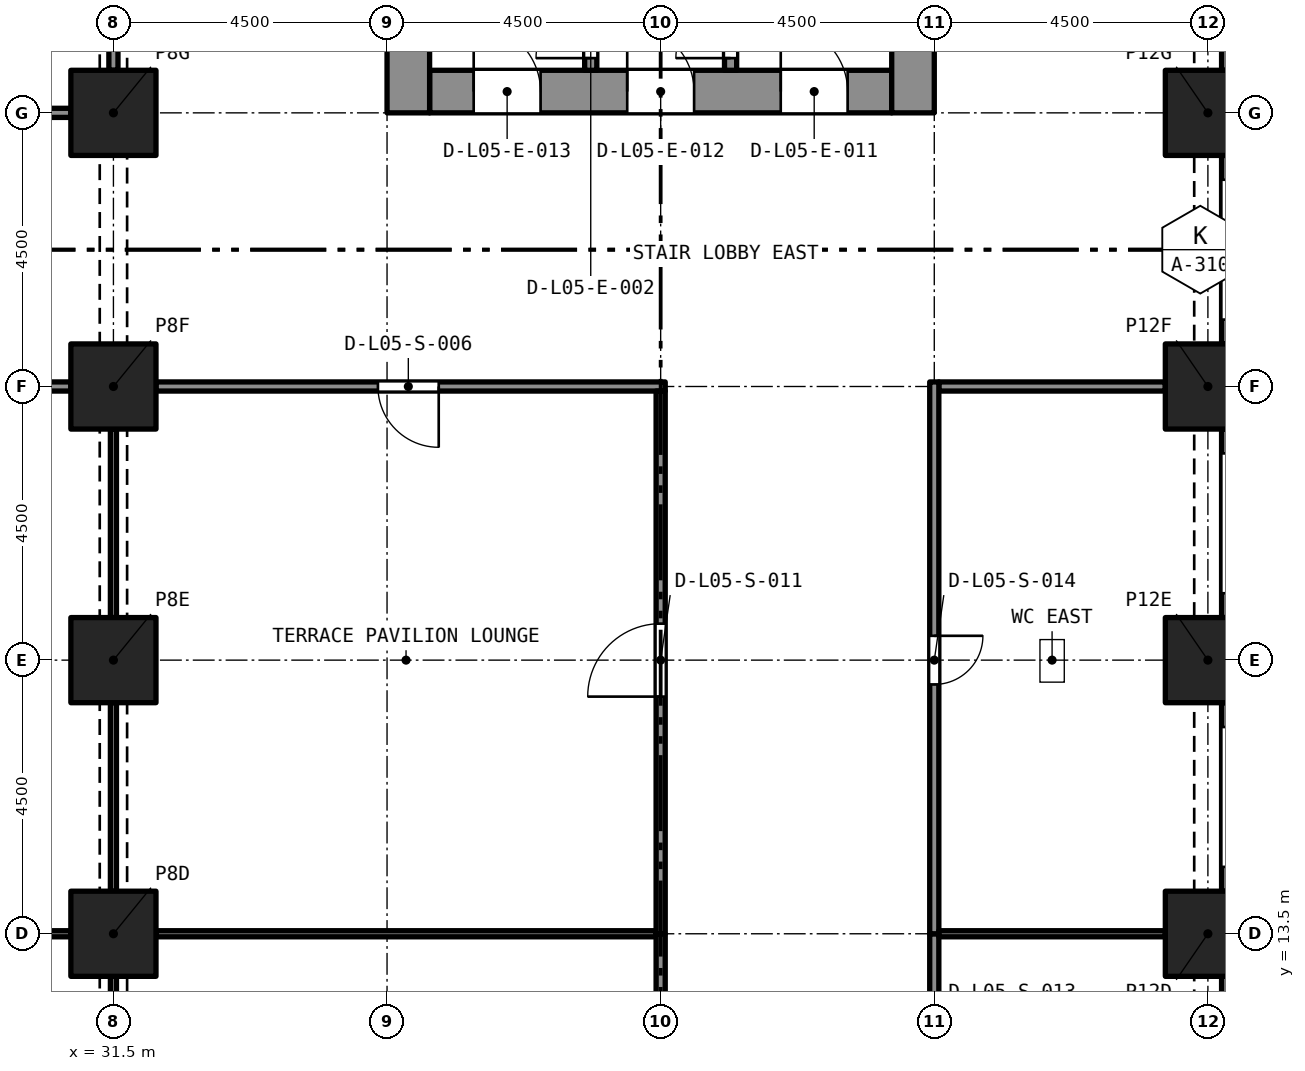
"""IFC4 building model, lengths in metres.
Left out: names, types, materials, properties, quantities, classifications, styles, units other than length and angle.
Written with IfcOpenShell. Run it as: python <this file> out.ifc"""

import sys

from ifc_helpers import new_model, si_unit, direction, frame, frame_2d, origin, origin_2d, place, context, subcontext, project, spatial, rectangle, extrude, element, fill, save


model = new_model("IFC4")
c1 = context("Model", 3, precision=1e-05, world=origin(), true_north=direction((0.0, 1.0)))
c2 = subcontext(c1, "Body", "Model", "MODEL_VIEW")
j1 = project(units=[si_unit("LENGTHUNIT", "METRE"), si_unit("PLANEANGLEUNIT", "RADIAN")], contexts=[c1])
p1 = place(None, origin())
s1 = spatial("IfcSite", under=j1, at=p1, CompositionType="ELEMENT")
p2 = place(p1, origin())
s2 = spatial("IfcBuilding", under=s1, at=p2, CompositionType="ELEMENT")
p3 = place(p2, frame((0.0, 0.0, 26.0)))
s3 = spatial("IfcBuildingStorey", under=s2, at=p3, CompositionType="ELEMENT", Elevation=26.0)
for number, where, z_axis, x_axis in (
    (1, (31.5, 13.5, 0.0), (0.0, 0.0, 1.0), (1.0, 0.0, 0.0)),
    (2, (49.5, 13.5, 0.0), (0.0, 0.0, 1.0), (1.0, 0.0, 0.0)),
    (3, (31.5, 18.0, 0.0), (0.0, 0.0, 1.0), (1.0, 0.0, 0.0)),
    (4, (49.5, 18.0, 0.0), (0.0, 0.0, 1.0), (1.0, 0.0, 0.0)),
    (5, (31.5, 22.5, 0.0), (0.0, 0.0, 1.0), (1.0, 0.0, 0.0)),
    (6, (49.5, 22.5, 0.0), (0.0, 0.0, 1.0), (1.0, 0.0, 0.0)),
    (7, (31.5, 27.0, 0.0), (0.0, 0.0, 1.0), (1.0, 0.0, 0.0)),
    (8, (49.5, 27.0, 0.0), (0.0, 0.0, 1.0), (1.0, 0.0, 0.0)),
):
    element("IfcColumn", number, at=place(p3, frame(where, z_axis=z_axis, x_axis=x_axis)), inside=s3, PredefinedType="COLUMN", context=c2, shape_type="SweptSolid", body=[
        extrude(rectangle(XDim=1.4, YDim=1.4, at=origin_2d()), origin(), (0.0, 0.0, 1.0), 4.4),
    ])
p4 = place(p3, frame((36.7, 27.35, 0.0), z_axis=(0.0, 0.0, 1.0), x_axis=(1.0, 0.0, 0.0)))
e9 = element("IfcWall", 9, at=p4, inside=s3, PredefinedType="SOLIDWALL", context=c2, shape_type="SweptSolid", body=[
    extrude(rectangle(XDim=7.6, YDim=0.7, at=frame_2d((3.8, 0.0))), origin(), (0.0, 0.0, 1.0), 4.4),
])
p5 = place(p4, frame((5.775, 0.0, 0.0)))
e10 = element("IfcOpeningElement", 10, at=p5, cuts=e9, PredefinedType="OPENING", context=c2, shape_type="SweptSolid", body=[
    extrude(rectangle(XDim=1.1, YDim=2.1, at=frame_2d((0.55, 1.05))), frame((0.0, 0.36, 0.0), z_axis=(0.0, -1.0, 0.0), x_axis=(1.0, 0.0, 0.0)), (0.0, 0.0, 1.0), 0.72),
])
p6 = place(p4, frame((3.25, 0.0, 0.0)))
e11 = element("IfcOpeningElement", 11, at=p6, cuts=e9, PredefinedType="OPENING", context=c2, shape_type="SweptSolid", body=[
    extrude(rectangle(XDim=1.1, YDim=2.1, at=frame_2d((0.55, 1.05))), frame((0.0, 0.36, 0.0), z_axis=(0.0, -1.0, 0.0), x_axis=(1.0, 0.0, 0.0)), (0.0, 0.0, 1.0), 0.72),
])
p7 = place(p4, frame((0.725, 0.0, 0.0)))
e12 = element("IfcOpeningElement", 12, at=p7, cuts=e9, PredefinedType="OPENING", context=c2, shape_type="SweptSolid", body=[
    extrude(rectangle(XDim=1.1, YDim=2.1, at=frame_2d((0.55, 1.05))), frame((0.0, 0.36, 0.0), z_axis=(0.0, -1.0, 0.0), x_axis=(1.0, 0.0, 0.0)), (0.0, 0.0, 1.0), 0.72),
])
p8 = place(p3, frame((36.35, 27.0, 0.0), z_axis=(0.0, 0.0, 1.0), x_axis=(0.0, 1.0, 0.0)))
e13 = element("IfcWall", 13, at=p8, inside=s3, PredefinedType="SOLIDWALL", context=c2, shape_type="SweptSolid", body=[
    extrude(rectangle(XDim=13.5, YDim=0.7, at=frame_2d((6.75, 0.0))), origin(), (0.0, 0.0, 1.0), 4.4),
])
p9 = place(p8, frame((8.95, 0.0, 0.0)))
e14 = element("IfcOpeningElement", 14, at=p9, cuts=e13, PredefinedType="OPENING", context=c2, shape_type="SweptSolid", body=[
    extrude(rectangle(XDim=1.2, YDim=2.1, at=frame_2d((0.6, 1.05))), frame((0.0, 0.36, 0.0), z_axis=(0.0, -1.0, 0.0), x_axis=(1.0, 0.0, 0.0)), (0.0, 0.0, 1.0), 0.72),
])
p10 = place(p3, frame((44.65, 27.0, 0.0), z_axis=(0.0, 0.0, 1.0), x_axis=(0.0, 1.0, 0.0)))
e15 = element("IfcWall", 15, at=p10, inside=s3, PredefinedType="SOLIDWALL", context=c2, shape_type="SweptSolid", body=[
    extrude(rectangle(XDim=13.5, YDim=0.7, at=frame_2d((6.75, 0.0))), origin(), (0.0, 0.0, 1.0), 4.4),
])
p11 = place(p10, frame((8.95, 0.0, 0.0)))
e16 = element("IfcOpeningElement", 16, at=p11, cuts=e15, PredefinedType="OPENING", context=c2, shape_type="SweptSolid", body=[
    extrude(rectangle(XDim=1.2, YDim=2.1, at=frame_2d((0.6, 1.05))), frame((0.0, 0.36, 0.0), z_axis=(0.0, -1.0, 0.0), x_axis=(1.0, 0.0, 0.0)), (0.0, 0.0, 1.0), 0.72),
])
p12 = place(p3, frame((49.875, 12.8, 0.0), z_axis=(0.0, 0.0, 1.0), x_axis=(0.0, -1.0, 0.0)))
e17 = element("IfcWall", 17, at=p12, inside=s3, PredefinedType="SOLIDWALL", context=c2, shape_type="SweptSolid", body=[
    extrude(rectangle(XDim=3.1, YDim=0.3, at=frame_2d((1.55, 0.0))), origin(), (0.0, 0.0, 1.0), 4.4),
])
p13 = place(p12, frame((0.4, 0.0, 0.45)))
e18 = element("IfcOpeningElement", 18, at=p13, cuts=e17, PredefinedType="OPENING", context=c2, shape_type="SweptSolid", body=[
    extrude(rectangle(XDim=2.3, YDim=2.55, at=frame_2d((1.15, 1.275))), frame((0.0, 0.16, 0.0), z_axis=(0.0, -1.0, 0.0), x_axis=(1.0, 0.0, 0.0)), (0.0, 0.0, 1.0), 0.32),
])
p14 = place(p3, frame((49.875, 17.3, 0.0), z_axis=(0.0, 0.0, 1.0), x_axis=(0.0, -1.0, 0.0)))
e19 = element("IfcWall", 19, at=p14, inside=s3, PredefinedType="SOLIDWALL", context=c2, shape_type="SweptSolid", body=[
    extrude(rectangle(XDim=3.1, YDim=0.3, at=frame_2d((1.55, 0.0))), origin(), (0.0, 0.0, 1.0), 4.4),
])
p15 = place(p14, frame((0.4, 0.0, 0.45)))
e20 = element("IfcOpeningElement", 20, at=p15, cuts=e19, PredefinedType="OPENING", context=c2, shape_type="SweptSolid", body=[
    extrude(rectangle(XDim=2.3, YDim=2.55, at=frame_2d((1.15, 1.275))), frame((0.0, 0.16, 0.0), z_axis=(0.0, -1.0, 0.0), x_axis=(1.0, 0.0, 0.0)), (0.0, 0.0, 1.0), 0.32),
])
p16 = place(p3, frame((49.875, 21.8, 0.0), z_axis=(0.0, 0.0, 1.0), x_axis=(0.0, -1.0, 0.0)))
e21 = element("IfcWall", 21, at=p16, inside=s3, PredefinedType="SOLIDWALL", context=c2, shape_type="SweptSolid", body=[
    extrude(rectangle(XDim=3.1, YDim=0.3, at=frame_2d((1.55, 0.0))), origin(), (0.0, 0.0, 1.0), 4.4),
])
p17 = place(p16, frame((0.4, 0.0, 0.45)))
e22 = element("IfcOpeningElement", 22, at=p17, cuts=e21, PredefinedType="OPENING", context=c2, shape_type="SweptSolid", body=[
    extrude(rectangle(XDim=2.3, YDim=2.55, at=frame_2d((1.15, 1.275))), frame((0.0, 0.16, 0.0), z_axis=(0.0, -1.0, 0.0), x_axis=(1.0, 0.0, 0.0)), (0.0, 0.0, 1.0), 0.32),
])
p18 = place(p3, frame((49.875, 26.3, 0.0), z_axis=(0.0, 0.0, 1.0), x_axis=(0.0, -1.0, 0.0)))
e23 = element("IfcWall", 23, at=p18, inside=s3, PredefinedType="SOLIDWALL", context=c2, shape_type="SweptSolid", body=[
    extrude(rectangle(XDim=3.1, YDim=0.3, at=frame_2d((1.55, 0.0))), origin(), (0.0, 0.0, 1.0), 4.4),
])
p19 = place(p18, frame((0.4, 0.0, 0.45)))
e24 = element("IfcOpeningElement", 24, at=p19, cuts=e23, PredefinedType="OPENING", context=c2, shape_type="SweptSolid", body=[
    extrude(rectangle(XDim=2.3, YDim=2.55, at=frame_2d((1.15, 1.275))), frame((0.0, 0.16, 0.0), z_axis=(0.0, -1.0, 0.0), x_axis=(1.0, 0.0, 0.0)), (0.0, 0.0, 1.0), 0.32),
])
p20 = place(p3, frame((49.875, 30.8, 0.0), z_axis=(0.0, 0.0, 1.0), x_axis=(0.0, -1.0, 0.0)))
e25 = element("IfcWall", 25, at=p20, inside=s3, PredefinedType="SOLIDWALL", context=c2, shape_type="SweptSolid", body=[
    extrude(rectangle(XDim=3.1, YDim=0.3, at=frame_2d((1.55, 0.0))), origin(), (0.0, 0.0, 1.0), 4.4),
])
p21 = place(p20, frame((0.4, 0.0, 0.45)))
e26 = element("IfcOpeningElement", 26, at=p21, cuts=e25, PredefinedType="OPENING", context=c2, shape_type="SweptSolid", body=[
    extrude(rectangle(XDim=2.3, YDim=2.55, at=frame_2d((1.15, 1.275))), frame((0.0, 0.16, 0.0), z_axis=(0.0, -1.0, 0.0), x_axis=(1.0, 0.0, 0.0)), (0.0, 0.0, 1.0), 0.32),
])
p22 = place(p3, frame((41.65, 27.7, 0.0), z_axis=(0.0, 0.0, 1.0), x_axis=(0.0, 1.0, 0.0)))
e27 = element("IfcWall", 27, at=p22, inside=s3, PredefinedType="SOLIDWALL", context=c2, shape_type="SweptSolid", body=[
    extrude(rectangle(XDim=5.4, YDim=0.2, at=frame_2d((2.7, 0.0))), origin(), (0.0, 0.0, 1.0), 4.1),
])
p23 = place(p22, frame((0.2, 0.0, 0.0)))
e28 = element("IfcOpeningElement", 28, at=p23, cuts=e27, PredefinedType="OPENING", context=c2, shape_type="SweptSolid", body=[
    extrude(rectangle(XDim=0.9, YDim=2.1, at=frame_2d((0.45, 1.05))), frame((0.0, 0.11, 0.0), z_axis=(0.0, -1.0, 0.0), x_axis=(1.0, 0.0, 0.0)), (0.0, 0.0, 1.0), 0.22),
])
p24 = place(p3, frame((39.35, 27.7, 0.0), z_axis=(0.0, 0.0, 1.0), x_axis=(0.0, 1.0, 0.0)))
e29 = element("IfcWall", 29, at=p24, inside=s3, PredefinedType="SOLIDWALL", context=c2, shape_type="SweptSolid", body=[
    extrude(rectangle(XDim=5.4, YDim=0.2, at=frame_2d((2.7, 0.0))), origin(), (0.0, 0.0, 1.0), 4.1),
])
p25 = place(p24, frame((0.2, 0.0, 0.0)))
e30 = element("IfcOpeningElement", 30, at=p25, cuts=e29, PredefinedType="OPENING", context=c2, shape_type="SweptSolid", body=[
    extrude(rectangle(XDim=0.9, YDim=2.1, at=frame_2d((0.45, 1.05))), frame((0.0, 0.11, 0.0), z_axis=(0.0, -1.0, 0.0), x_axis=(1.0, 0.0, 0.0)), (0.0, 0.0, 1.0), 0.22),
])
p26 = place(p3, frame((18.7, 27.0, 0.0), z_axis=(0.0, 0.0, 1.0), x_axis=(1.0, 0.0, 0.0)))
e31 = element("IfcWall", 31, at=p26, inside=s3, PredefinedType="PARTITIONING", context=c2, shape_type="SweptSolid", body=[
    extrude(rectangle(XDim=12.1, YDim=0.15, at=frame_2d((6.05, 0.0))), origin(), (0.0, 0.0, 1.0), 3.95),
])
p27 = place(p26, frame((5.45, 0.0, 0.0)))
e32 = element("IfcOpeningElement", 32, at=p27, cuts=e31, PredefinedType="OPENING", context=c2, shape_type="SweptSolid", body=[
    extrude(rectangle(XDim=1.2, YDim=2.1, at=frame_2d((0.6, 1.05))), frame((0.0, 0.085, 0.0), z_axis=(0.0, -1.0, 0.0), x_axis=(1.0, 0.0, 0.0)), (0.0, 0.0, 1.0), 0.17),
])
p28 = place(p3, frame((30.8, 22.5, 0.0), z_axis=(0.0, 0.0, 1.0), x_axis=(-1.0, 0.0, 0.0)))
e33 = element("IfcWall", 33, at=p28, inside=s3, PredefinedType="PARTITIONING", context=c2, shape_type="SweptSolid", body=[
    extrude(rectangle(XDim=12.1, YDim=0.15, at=frame_2d((6.05, 0.0))), origin(), (0.0, 0.0, 1.0), 3.95),
])
p29 = place(p28, frame((5.55, 0.0, 0.0)))
e34 = element("IfcOpeningElement", 34, at=p29, cuts=e33, PredefinedType="OPENING", context=c2, shape_type="SweptSolid", body=[
    extrude(rectangle(XDim=1.0, YDim=2.1, at=frame_2d((0.5, 1.05))), frame((0.0, 0.085, 0.0), z_axis=(0.0, -1.0, 0.0), x_axis=(1.0, 0.0, 0.0)), (0.0, 0.0, 1.0), 0.17),
])
p30 = place(p3, frame((31.5, 27.7, 0.0), z_axis=(0.0, 0.0, 1.0), x_axis=(0.0, 1.0, 0.0)))
e35 = element("IfcWall", 35, at=p30, inside=s3, PredefinedType="PARTITIONING", context=c2, shape_type="SweptSolid", body=[
    extrude(rectangle(XDim=3.1, YDim=0.15, at=frame_2d((1.55, 0.0))), origin(), (0.0, 0.0, 1.0), 3.58),
])
p31 = place(p3, frame((30.8, 13.5, 0.0), z_axis=(0.0, 0.0, 1.0), x_axis=(-1.0, 0.0, 0.0)))
e36 = element("IfcWall", 36, at=p31, inside=s3, PredefinedType="PARTITIONING", context=c2, shape_type="SweptSolid", body=[
    extrude(rectangle(XDim=12.1, YDim=0.1, at=frame_2d((6.05, 0.0))), origin(), (0.0, 0.0, 1.0), 3.95),
])
p32 = place(p31, frame((5.55, 0.0, 0.0)))
e37 = element("IfcOpeningElement", 37, at=p32, cuts=e36, PredefinedType="OPENING", context=c2, shape_type="SweptSolid", body=[
    extrude(rectangle(XDim=1.0, YDim=2.1, at=frame_2d((0.5, 1.05))), frame((0.0, 0.06, 0.0), z_axis=(0.0, -1.0, 0.0), x_axis=(1.0, 0.0, 0.0)), (0.0, 0.0, 1.0), 0.12),
])
for number, where, z_axis, x_axis in (
    (38, (31.5, 9.7, 0.0), (0.0, 0.0, 1.0), (0.0, 1.0, 0.0)),
    (39, (31.5, 18.7, 0.0), (0.0, 0.0, 1.0), (0.0, 1.0, 0.0)),
    (40, (31.5, 14.2, 0.0), (0.0, 0.0, 1.0), (0.0, 1.0, 0.0)),
):
    element("IfcWall", number, at=place(p3, frame(where, z_axis=z_axis, x_axis=x_axis)), inside=s3, PredefinedType="PARTITIONING", context=c2, shape_type="SweptSolid", body=[
        extrude(rectangle(XDim=3.1, YDim=0.1, at=frame_2d((1.55, 0.0))), origin(), (0.0, 0.0, 1.0), 3.58),
    ])
p33 = place(p3, frame((40.575, 22.5, 0.0), z_axis=(0.0, 0.0, 1.0), x_axis=(-1.0, 0.0, 0.0)))
e41 = element("IfcWall", 41, at=p33, inside=s3, PredefinedType="PARTITIONING", context=c2, shape_type="SweptSolid", body=[
    extrude(rectangle(XDim=8.375, YDim=0.15, at=frame_2d((4.188, 0.0))), origin(), (0.0, 0.0, 1.0), 4.1),
])
p34 = place(p33, frame((3.725, 0.0, 0.0)))
e42 = element("IfcOpeningElement", 42, at=p34, cuts=e41, PredefinedType="OPENING", context=c2, shape_type="SweptSolid", body=[
    extrude(rectangle(XDim=1.0, YDim=2.1, at=frame_2d((0.5, 1.05))), frame((0.0, 0.085, 0.0), z_axis=(0.0, -1.0, 0.0), x_axis=(1.0, 0.0, 0.0)), (0.0, 0.0, 1.0), 0.17),
])
p35 = place(p3, frame((45.075, 22.5, 0.0), z_axis=(0.0, 0.0, 1.0), x_axis=(1.0, 0.0, 0.0)))
e43 = element("IfcWall", 43, at=p35, inside=s3, PredefinedType="PARTITIONING", context=c2, shape_type="SweptSolid", body=[
    extrude(rectangle(XDim=3.725, YDim=0.15, at=frame_2d((1.863, 0.0))), origin(), (0.0, 0.0, 1.0), 4.1),
])
p36 = place(p3, frame((32.2, 13.5, 0.0), z_axis=(0.0, 0.0, 1.0), x_axis=(1.0, 0.0, 0.0)))
e44 = element("IfcWall", 44, at=p36, inside=s3, PredefinedType="PARTITIONING", context=c2, shape_type="SweptSolid", body=[
    extrude(rectangle(XDim=8.225, YDim=0.1, at=frame_2d((4.113, 0.0))), origin(), (0.0, 0.0, 1.0), 4.1),
])
p37 = place(p3, frame((40.5, 0.7, 0.0), z_axis=(0.0, 0.0, 1.0), x_axis=(0.0, 1.0, 0.0)))
e45 = element("IfcWall", 45, at=p37, inside=s3, PredefinedType="PARTITIONING", context=c2, shape_type="SweptSolid", body=[
    extrude(rectangle(XDim=12.8, YDim=0.15, at=frame_2d((6.4, 0.0))), origin(), (0.0, 0.0, 1.0), 4.1),
])
p38 = place(p37, frame((5.8, 0.0, 0.0)))
e46 = element("IfcOpeningElement", 46, at=p38, cuts=e45, PredefinedType="OPENING", context=c2, shape_type="SweptSolid", body=[
    extrude(rectangle(XDim=1.2, YDim=2.1, at=frame_2d((0.6, 1.05))), frame((0.0, 0.085, 0.0), z_axis=(0.0, -1.0, 0.0), x_axis=(1.0, 0.0, 0.0)), (0.0, 0.0, 1.0), 0.17),
])
p39 = place(p3, frame((40.5, 13.5, 0.0), z_axis=(0.0, 0.0, 1.0), x_axis=(0.0, 1.0, 0.0)))
e47 = element("IfcWall", 47, at=p39, inside=s3, PredefinedType="PARTITIONING", context=c2, shape_type="SweptSolid", body=[
    extrude(rectangle(XDim=8.925, YDim=0.15, at=frame_2d((4.462, 0.0))), origin(), (0.0, 0.0, 1.0), 4.1),
])
p40 = place(p39, frame((3.9, 0.0, 0.0)))
e48 = element("IfcOpeningElement", 48, at=p40, cuts=e47, PredefinedType="OPENING", context=c2, shape_type="SweptSolid", body=[
    extrude(rectangle(XDim=1.2, YDim=2.1, at=frame_2d((0.6, 1.05))), frame((0.0, 0.085, 0.0), z_axis=(0.0, -1.0, 0.0), x_axis=(1.0, 0.0, 0.0)), (0.0, 0.0, 1.0), 0.17),
])
p41 = place(p3, frame((45.0, 13.5, 0.0), z_axis=(0.0, 0.0, 1.0), x_axis=(0.0, -1.0, 0.0)))
e49 = element("IfcWall", 49, at=p41, inside=s3, PredefinedType="PARTITIONING", context=c2, shape_type="SweptSolid", body=[
    extrude(rectangle(XDim=4.5, YDim=0.15, at=frame_2d((2.25, 0.0))), origin(), (0.0, 0.0, 1.0), 4.1),
])
p42 = place(p41, frame((1.85, 0.0, 0.0)))
e50 = element("IfcOpeningElement", 50, at=p42, cuts=e49, PredefinedType="OPENING", context=c2, shape_type="SweptSolid", body=[
    extrude(rectangle(XDim=0.8, YDim=2.1, at=frame_2d((0.4, 1.05))), frame((0.0, 0.085, 0.0), z_axis=(0.0, -1.0, 0.0), x_axis=(1.0, 0.0, 0.0)), (0.0, 0.0, 1.0), 0.17),
])
p43 = place(p3, frame((45.0, 22.575, 0.0), z_axis=(0.0, 0.0, 1.0), x_axis=(0.0, -1.0, 0.0)))
e51 = element("IfcWall", 51, at=p43, inside=s3, PredefinedType="PARTITIONING", context=c2, shape_type="SweptSolid", body=[
    extrude(rectangle(XDim=9.075, YDim=0.15, at=frame_2d((4.538, 0.0))), origin(), (0.0, 0.0, 1.0), 4.1),
])
p44 = place(p43, frame((4.175, 0.0, 0.0)))
e52 = element("IfcOpeningElement", 52, at=p44, cuts=e51, PredefinedType="OPENING", context=c2, shape_type="SweptSolid", body=[
    extrude(rectangle(XDim=0.8, YDim=2.1, at=frame_2d((0.4, 1.05))), frame((0.0, 0.085, 0.0), z_axis=(0.0, -1.0, 0.0), x_axis=(1.0, 0.0, 0.0)), (0.0, 0.0, 1.0), 0.17),
])
p45 = place(p3, frame((45.075, 13.5, 0.0), z_axis=(0.0, 0.0, 1.0), x_axis=(1.0, 0.0, 0.0)))
e53 = element("IfcWall", 53, at=p45, inside=s3, PredefinedType="PARTITIONING", context=c2, shape_type="SweptSolid", body=[
    extrude(rectangle(XDim=3.725, YDim=0.1, at=frame_2d((1.863, 0.0))), origin(), (0.0, 0.0, 1.0), 4.1),
])
p46 = place(p23, origin())
e54 = element("IfcDoor", 54, at=p46, inside=s3, OperationType="SINGLE_SWING_LEFT", PredefinedType="DOOR", context=c2, shape_type="SweptSolid", body=[
    extrude(rectangle(XDim=0.9, YDim=2.1, at=frame_2d((0.45, 1.05))), frame((0.0, 0.025, 0.0), z_axis=(0.0, -1.0, 0.0), x_axis=(1.0, 0.0, 0.0)), (0.0, 0.0, 1.0), 0.05),
])
fill(e28, e54)
p47 = place(p25, origin())
e55 = element("IfcDoor", 55, at=p47, inside=s3, OperationType="SINGLE_SWING_LEFT", PredefinedType="DOOR", context=c2, shape_type="SweptSolid", body=[
    extrude(rectangle(XDim=0.9, YDim=2.1, at=frame_2d((0.45, 1.05))), frame((0.0, 0.025, 0.0), z_axis=(0.0, -1.0, 0.0), x_axis=(1.0, 0.0, 0.0)), (0.0, 0.0, 1.0), 0.05),
])
fill(e30, e55)
p48 = place(p5, origin())
e56 = element("IfcDoor", 56, at=p48, inside=s3, OperationType="SINGLE_SWING_LEFT", PredefinedType="DOOR", context=c2, shape_type="SweptSolid", body=[
    extrude(rectangle(XDim=1.1, YDim=2.1, at=frame_2d((0.55, 1.05))), frame((0.0, 0.025, 0.0), z_axis=(0.0, -1.0, 0.0), x_axis=(1.0, 0.0, 0.0)), (0.0, 0.0, 1.0), 0.05),
])
fill(e10, e56)
p49 = place(p6, origin())
e57 = element("IfcDoor", 57, at=p49, inside=s3, OperationType="SINGLE_SWING_LEFT", PredefinedType="DOOR", context=c2, shape_type="SweptSolid", body=[
    extrude(rectangle(XDim=1.1, YDim=2.1, at=frame_2d((0.55, 1.05))), frame((0.0, 0.025, 0.0), z_axis=(0.0, -1.0, 0.0), x_axis=(1.0, 0.0, 0.0)), (0.0, 0.0, 1.0), 0.05),
])
fill(e11, e57)
p50 = place(p7, origin())
e58 = element("IfcDoor", 58, at=p50, inside=s3, OperationType="SINGLE_SWING_LEFT", PredefinedType="DOOR", context=c2, shape_type="SweptSolid", body=[
    extrude(rectangle(XDim=1.1, YDim=2.1, at=frame_2d((0.55, 1.05))), frame((0.0, 0.025, 0.0), z_axis=(0.0, -1.0, 0.0), x_axis=(1.0, 0.0, 0.0)), (0.0, 0.0, 1.0), 0.05),
])
fill(e12, e58)
p51 = place(p34, origin())
e59 = element("IfcDoor", 59, at=p51, inside=s3, OperationType="SINGLE_SWING_RIGHT", PredefinedType="DOOR", context=c2, shape_type="SweptSolid", body=[
    extrude(rectangle(XDim=1.0, YDim=2.1, at=frame_2d((0.5, 1.05))), frame((0.0, 0.025, 0.0), z_axis=(0.0, -1.0, 0.0), x_axis=(1.0, 0.0, 0.0)), (0.0, 0.0, 1.0), 0.05),
])
fill(e42, e59)
p52 = place(p40, origin())
e60 = element("IfcDoor", 60, at=p52, inside=s3, OperationType="SINGLE_SWING_RIGHT", PredefinedType="DOOR", context=c2, shape_type="SweptSolid", body=[
    extrude(rectangle(XDim=1.2, YDim=2.1, at=frame_2d((0.6, 1.05))), frame((0.0, 0.025, 0.0), z_axis=(0.0, -1.0, 0.0), x_axis=(1.0, 0.0, 0.0)), (0.0, 0.0, 1.0), 0.05),
])
fill(e48, e60)
p53 = place(p44, origin())
e61 = element("IfcDoor", 61, at=p53, inside=s3, OperationType="SINGLE_SWING_RIGHT", PredefinedType="DOOR", context=c2, shape_type="SweptSolid", body=[
    extrude(rectangle(XDim=0.8, YDim=2.1, at=frame_2d((0.4, 1.05))), frame((0.0, 0.025, 0.0), z_axis=(0.0, -1.0, 0.0), x_axis=(1.0, 0.0, 0.0)), (0.0, 0.0, 1.0), 0.05),
])
fill(e52, e61)
save(model, sys.argv[1])
